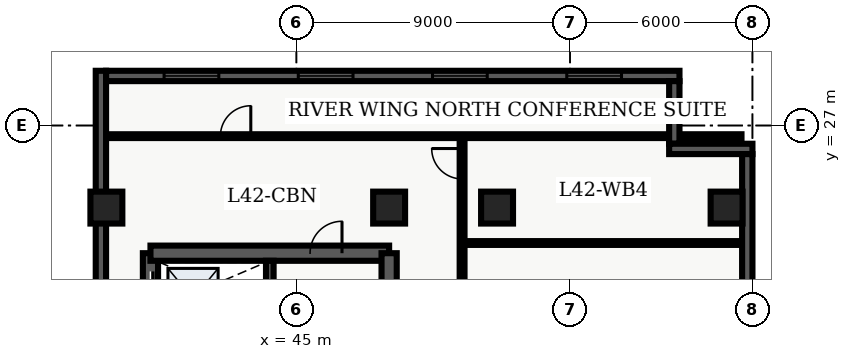
"""IFC4 building model, lengths in metres.
Left out: names, types, materials, properties, quantities, classifications, styles, units other than length and angle.
Written with IfcOpenShell. Run it as: python <this file> out.ifc"""

import sys

from ifc_helpers import new_model, entity, si_unit, converted_unit, direction, frame, origin_with_axes, origin_2d_with_axis, place, context, subcontext, project, spatial, polyline, rectangle, outline, extrude, element, fill, save


model = new_model("IFC4")
c1 = context("Model", 3, precision=1e-05, world=origin_with_axes(), true_north=direction((0.0, 1.0)))
c2 = subcontext(c1, "Body", "Model", "MODEL_VIEW")
j1 = project(units=[si_unit("LENGTHUNIT", "METRE"), converted_unit("PLANEANGLEUNIT", "DEGREE", entity("IfcPlaneAngleMeasure", 0.017), si_unit("PLANEANGLEUNIT", "RADIAN"), dimensions=[0, 0, 0, 0, 0, 0, 0])], contexts=[c1])
p1 = place(None, origin_with_axes())
s1 = spatial("IfcSite", under=j1, at=p1, CompositionType="ELEMENT")
p2 = place(p1, origin_with_axes())
s2 = spatial("IfcBuilding", under=s1, at=p2, CompositionType="ELEMENT")
p3 = place(p2, frame((0.0, 0.0, 171.9), z_axis=(0.0, 0.0, 1.0), x_axis=(1.0, 0.0, 0.0)))
s3 = spatial("IfcBuildingStorey", under=s2, at=p3, CompositionType="ELEMENT", Elevation=171.9)
p4 = place(p3, frame((40.2, 7.2, 0.0), z_axis=(0.0, 0.0, 1.0), x_axis=(0.0, 1.0, 0.0)))
e1 = element("IfcWall", 1, at=p4, inside=s3, PredefinedType="SHEAR", context=c2, shape_type="SweptSolid", body=[
    extrude(outline(polyline([(0.0, -0.25), (15.6, -0.25), (15.6, 0.25), (0.0, 0.25), (0.0, -0.25)])), origin_with_axes(), (0.0, 0.0, 1.0), 3.66),
])
p5 = place(p4, frame((14.475, 0.0, 0.0), z_axis=(0.0, 0.0, 1.0), x_axis=(1.0, 0.0, 0.0)))
e2 = element("IfcOpeningElement", 2, at=p5, cuts=e1, PredefinedType="OPENING", context=c2, shape_type="SweptSolid", body=[
    extrude(rectangle(XDim=1.05, YDim=0.52, at=origin_2d_with_axis()), origin_with_axes(), (0.0, 0.0, 1.0), 2.15),
])
p6 = place(p4, frame((12.75, 0.0, 0.0), z_axis=(0.0, 0.0, 1.0), x_axis=(1.0, 0.0, 0.0)))
e3 = element("IfcOpeningElement", 3, at=p6, cuts=e1, PredefinedType="OPENING", context=c2, shape_type="SweptSolid", body=[
    extrude(rectangle(XDim=1.2, YDim=0.52, at=origin_2d_with_axis()), origin_with_axes(), (0.0, 0.0, 1.0), 2.15),
])
p7 = place(p4, frame((9.3, 0.0, 0.0), z_axis=(0.0, 0.0, 1.0), x_axis=(1.0, 0.0, 0.0)))
e4 = element("IfcOpeningElement", 4, at=p7, cuts=e1, PredefinedType="OPENING", context=c2, shape_type="SweptSolid", body=[
    extrude(rectangle(XDim=0.9, YDim=0.52, at=origin_2d_with_axis()), origin_with_axes(), (0.0, 0.0, 1.0), 2.15),
])
p8 = place(p3, frame((40.2, 22.8, 0.0), z_axis=(0.0, 0.0, 1.0), x_axis=(1.0, 0.0, 0.0)))
e5 = element("IfcWall", 5, at=p8, inside=s3, PredefinedType="SHEAR", context=c2, shape_type="SweptSolid", body=[
    extrude(outline(polyline([(0.0, -0.25), (7.85, -0.25), (7.85, 0.25), (0.0, 0.25), (0.0, -0.25)])), origin_with_axes(), (0.0, 0.0, 1.0), 3.66),
])
p9 = place(p8, frame((5.775, 0.0, 0.0), z_axis=(0.0, 0.0, 1.0), x_axis=(1.0, 0.0, 0.0)))
e6 = element("IfcOpeningElement", 6, at=p9, cuts=e5, PredefinedType="OPENING", context=c2, shape_type="SweptSolid", body=[
    extrude(rectangle(XDim=1.05, YDim=0.52, at=origin_2d_with_axis()), origin_with_axes(), (0.0, 0.0, 1.0), 2.15),
])
p10 = place(p3, frame((48.05, 7.2, 0.0), z_axis=(0.0, 0.0, 1.0), x_axis=(0.0, 1.0, 0.0)))
e7 = element("IfcWall", 7, at=p10, inside=s3, PredefinedType="SHEAR", context=c2, shape_type="SweptSolid", body=[
    extrude(outline(polyline([(0.0, -0.25), (15.6, -0.25), (15.6, 0.25), (0.0, 0.25), (0.0, -0.25)])), origin_with_axes(), (0.0, 0.0, 1.0), 3.66),
])
p11 = place(p10, frame((5.975, 0.0, 0.0), z_axis=(0.0, 0.0, 1.0), x_axis=(1.0, 0.0, 0.0)))
e8 = element("IfcOpeningElement", 8, at=p11, cuts=e7, PredefinedType="OPENING", context=c2, shape_type="SweptSolid", body=[
    extrude(rectangle(XDim=1.05, YDim=0.52, at=origin_2d_with_axis()), origin_with_axes(), (0.0, 0.0, 1.0), 2.15),
])
p12 = place(p10, frame((2.725, 0.0, 0.0), z_axis=(0.0, 0.0, 1.0), x_axis=(1.0, 0.0, 0.0)))
e9 = element("IfcOpeningElement", 9, at=p12, cuts=e7, PredefinedType="OPENING", context=c2, shape_type="SweptSolid", body=[
    extrude(rectangle(XDim=0.95, YDim=0.52, at=origin_2d_with_axis()), origin_with_axes(), (0.0, 0.0, 1.0), 2.15),
])
p13 = place(p3, frame((44.125, 7.45, 0.0), z_axis=(0.0, 0.0, 1.0), x_axis=(0.0, 1.0, 0.0)))
e10 = element("IfcWall", 10, at=p13, inside=s3, PredefinedType="SHEAR", context=c2, shape_type="SweptSolid", body=[
    extrude(outline(polyline([(0.0, -0.125), (15.1, -0.125), (15.1, 0.125), (0.0, 0.125), (0.0, -0.125)])), origin_with_axes(), (0.0, 0.0, 1.0), 3.66),
])
for number, where, z_axis, x_axis in (
    (11, (38.75, 24.3, 0.0), (0.0, 0.0, 1.0), (1.0, 0.0, 0.0)),
    (12, (48.05, 24.3, 0.0), (0.0, 0.0, 1.0), (1.0, 0.0, 0.0)),
    (13, (51.6, 24.3, 0.0), (0.0, 0.0, 1.0), (1.0, 0.0, 0.0)),
    (14, (59.15, 24.3, 0.0), (0.0, 0.0, 1.0), (1.0, 0.0, 0.0)),
):
    element("IfcColumn", number, at=place(p3, frame(where, z_axis=z_axis, x_axis=x_axis)), inside=s3, PredefinedType="COLUMN", context=c2, shape_type="SweptSolid", body=[
        extrude(rectangle(XDim=1.05, YDim=1.05, at=origin_2d_with_axis()), origin_with_axes(), (0.0, 0.0, 1.0), 3.9),
    ])
p14 = place(p3, frame((50.45, 7.85, 0.0), z_axis=(0.0, 0.0, 1.0), x_axis=(0.0, 1.0, 0.0)))
e15 = element("IfcWall", 15, at=p14, inside=s3, PredefinedType="PARTITIONING", context=c2, shape_type="SweptSolid", body=[
    extrude(outline(polyline([(0.0, -0.08), (18.8, -0.08), (18.8, 0.08), (0.0, 0.08), (0.0, -0.08)])), origin_with_axes(), (0.0, 0.0, 1.0), 2.7),
])
p15 = place(p14, frame((6.934, 0.0, 0.0), z_axis=(0.0, 0.0, 1.0), x_axis=(1.0, 0.0, 0.0)))
e16 = element("IfcOpeningElement", 16, at=p15, cuts=e15, PredefinedType="OPENING", context=c2, shape_type="SweptSolid", body=[
    extrude(rectangle(XDim=1.0, YDim=0.18, at=origin_2d_with_axis()), origin_with_axes(), (0.0, 0.0, 1.0), 2.15),
])
p16 = place(p14, frame((12.373, 0.0, 0.0), z_axis=(0.0, 0.0, 1.0), x_axis=(1.0, 0.0, 0.0)))
e17 = element("IfcOpeningElement", 17, at=p16, cuts=e15, PredefinedType="OPENING", context=c2, shape_type="SweptSolid", body=[
    extrude(rectangle(XDim=1.0, YDim=0.18, at=origin_2d_with_axis()), origin_with_axes(), (0.0, 0.0, 1.0), 2.15),
])
p17 = place(p14, frame((17.893, 0.0, 0.0), z_axis=(0.0, 0.0, 1.0), x_axis=(1.0, 0.0, 0.0)))
e18 = element("IfcOpeningElement", 18, at=p17, cuts=e15, PredefinedType="OPENING", context=c2, shape_type="SweptSolid", body=[
    extrude(rectangle(XDim=1.0, YDim=0.18, at=origin_2d_with_axis()), origin_with_axes(), (0.0, 0.0, 1.0), 2.15),
])
p18 = place(p3, frame((38.735, 26.65, 0.0), z_axis=(0.0, 0.0, 1.0), x_axis=(1.0, 0.0, 0.0)))
e19 = element("IfcWall", 19, at=p18, inside=s3, PredefinedType="PARTITIONING", context=c2, shape_type="SweptSolid", body=[
    extrude(outline(polyline([(0.0, -0.062), (20.905, -0.062), (20.905, 0.062), (0.0, 0.062), (0.0, -0.062)])), origin_with_axes(), (0.0, 0.0, 1.0), 2.7),
])
p19 = place(p18, frame((4.265, 0.0, 0.0), z_axis=(0.0, 0.0, 1.0), x_axis=(1.0, 0.0, 0.0)))
e20 = element("IfcOpeningElement", 20, at=p19, cuts=e19, PredefinedType="OPENING", context=c2, shape_type="SweptSolid", body=[
    extrude(rectangle(XDim=1.0, YDim=0.145, at=origin_2d_with_axis()), origin_with_axes(), (0.0, 0.0, 1.0), 2.15),
])
p20 = place(p3, frame((50.57, 23.135, 0.0), z_axis=(0.0, 0.0, 1.0), x_axis=(1.0, 0.0, 0.0)))
e21 = element("IfcWall", 21, at=p20, inside=s3, PredefinedType="PARTITIONING", context=c2, shape_type="SweptSolid", body=[
    extrude(outline(polyline([(0.0, -0.062), (9.095, -0.062), (9.095, 0.062), (0.0, 0.062), (0.0, -0.062)])), origin_with_axes(), (0.0, 0.0, 1.0), 2.7),
])
p21 = place(p3, frame((38.57, 21.26, 0.0), z_axis=(0.0, 0.0, 1.0), x_axis=(0.0, 1.0, 0.0)))
e22 = element("IfcWall", 22, at=p21, inside=s3, PredefinedType="SOLIDWALL", context=c2, shape_type="SweptSolid", body=[
    extrude(outline(polyline([(0.0, -0.17), (7.54, -0.17), (7.54, 0.17), (0.0, 0.17), (0.0, -0.17)])), origin_with_axes(), (0.0, 0.0, 1.0), 3.66),
])
p22 = place(p3, frame((38.74, 28.63, 0.0), z_axis=(0.0, 0.0, 1.0), x_axis=(1.0, 0.0, 0.0)))
e23 = element("IfcWall", 23, at=p22, inside=s3, PredefinedType="SOLIDWALL", context=c2, shape_type="SweptSolid", body=[
    extrude(outline(polyline([(0.0, -0.17), (18.86, -0.17), (18.86, 0.17), (0.0, 0.17), (0.0, -0.17)])), origin_with_axes(), (0.0, 0.0, 1.0), 3.66),
])
p23 = place(p22, frame((2.808, 0.0, 0.45), z_axis=(0.0, 0.0, 1.0), x_axis=(1.0, 0.0, 0.0)))
e24 = element("IfcOpeningElement", 24, at=p23, cuts=e23, PredefinedType="OPENING", context=c2, shape_type="SweptSolid", body=[
    extrude(rectangle(XDim=1.8, YDim=0.36, at=origin_2d_with_axis()), origin_with_axes(), (0.0, 0.0, 1.0), 2.1),
])
p24 = place(p22, frame((7.222, 0.0, 0.45), z_axis=(0.0, 0.0, 1.0), x_axis=(1.0, 0.0, 0.0)))
e25 = element("IfcOpeningElement", 25, at=p24, cuts=e23, PredefinedType="OPENING", context=c2, shape_type="SweptSolid", body=[
    extrude(rectangle(XDim=1.8, YDim=0.36, at=origin_2d_with_axis()), origin_with_axes(), (0.0, 0.0, 1.0), 2.1),
])
p25 = place(p22, frame((11.637, 0.0, 0.45), z_axis=(0.0, 0.0, 1.0), x_axis=(1.0, 0.0, 0.0)))
e26 = element("IfcOpeningElement", 26, at=p25, cuts=e23, PredefinedType="OPENING", context=c2, shape_type="SweptSolid", body=[
    extrude(rectangle(XDim=1.8, YDim=0.36, at=origin_2d_with_axis()), origin_with_axes(), (0.0, 0.0, 1.0), 2.1),
])
p26 = place(p22, frame((16.053, 0.0, 0.45), z_axis=(0.0, 0.0, 1.0), x_axis=(1.0, 0.0, 0.0)))
e27 = element("IfcOpeningElement", 27, at=p26, cuts=e23, PredefinedType="OPENING", context=c2, shape_type="SweptSolid", body=[
    extrude(rectangle(XDim=1.8, YDim=0.36, at=origin_2d_with_axis()), origin_with_axes(), (0.0, 0.0, 1.0), 2.1),
])
p27 = place(p3, frame((57.43, 28.46, 0.0), z_axis=(0.0, 0.0, 1.0), x_axis=(0.0, -1.0, 0.0)))
e28 = element("IfcWall", 28, at=p27, inside=s3, PredefinedType="SOLIDWALL", context=c2, shape_type="SweptSolid", body=[
    extrude(outline(polyline([(0.0, -0.17), (2.06, -0.17), (2.06, 0.17), (0.0, 0.17), (0.0, -0.17)])), origin_with_axes(), (0.0, 0.0, 1.0), 3.66),
])
p28 = place(p3, frame((57.26, 26.23, 0.0), z_axis=(0.0, 0.0, 1.0), x_axis=(1.0, 0.0, 0.0)))
e29 = element("IfcWall", 29, at=p28, inside=s3, PredefinedType="SOLIDWALL", context=c2, shape_type="SweptSolid", body=[
    extrude(outline(polyline([(0.0, -0.17), (2.74, -0.17), (2.74, 0.17), (0.0, 0.17), (0.0, -0.17)])), origin_with_axes(), (0.0, 0.0, 1.0), 3.66),
])
p29 = place(p3, frame((59.83, 26.06, 0.0), z_axis=(0.0, 0.0, 1.0), x_axis=(0.0, -1.0, 0.0)))
e30 = element("IfcWall", 30, at=p29, inside=s3, PredefinedType="SOLIDWALL", context=c2, shape_type="SweptSolid", body=[
    extrude(outline(polyline([(0.0, -0.17), (23.66, -0.17), (23.66, 0.17), (0.0, 0.17), (0.0, -0.17)])), origin_with_axes(), (0.0, 0.0, 1.0), 3.66),
])
p30 = place(p29, frame((11.83, 0.0, 0.45), z_axis=(0.0, 0.0, 1.0), x_axis=(1.0, 0.0, 0.0)))
e31 = element("IfcOpeningElement", 31, at=p30, cuts=e30, PredefinedType="OPENING", context=c2, shape_type="SweptSolid", body=[
    extrude(rectangle(XDim=1.8, YDim=0.36, at=origin_2d_with_axis()), origin_with_axes(), (0.0, 0.0, 1.0), 2.1),
])
p31 = place(p29, frame((20.364, 0.0, 0.45), z_axis=(0.0, 0.0, 1.0), x_axis=(1.0, 0.0, 0.0)))
e32 = element("IfcOpeningElement", 32, at=p31, cuts=e30, PredefinedType="OPENING", context=c2, shape_type="SweptSolid", body=[
    extrude(rectangle(XDim=1.8, YDim=0.36, at=origin_2d_with_axis()), origin_with_axes(), (0.0, 0.0, 1.0), 2.1),
])
p32 = place(p4, frame((14.475, 0.0, 0.0), z_axis=(0.0, 0.0, 1.0), x_axis=(1.0, 0.0, 0.0)))
e33 = element("IfcDoor", 33, at=p32, inside=s3, OperationType="SLIDING_TO_RIGHT", PredefinedType="DOOR", context=c2, shape_type="SweptSolid", body=[
    extrude(rectangle(XDim=1.05, YDim=0.09, at=origin_2d_with_axis()), origin_with_axes(), (0.0, 0.0, 1.0), 2.15),
])
fill(e2, e33)
p33 = place(p8, frame((5.775, 0.0, 0.0), z_axis=(0.0, 0.0, 1.0), x_axis=(1.0, 0.0, 0.0)))
e34 = element("IfcDoor", 34, at=p33, inside=s3, OperationType="SINGLE_SWING_RIGHT", PredefinedType="DOOR", context=c2, shape_type="SweptSolid", body=[
    extrude(rectangle(XDim=1.05, YDim=0.09, at=origin_2d_with_axis()), origin_with_axes(), (0.0, 0.0, 1.0), 2.15),
])
fill(e6, e34)
p34 = place(p18, frame((4.265, 0.0, 0.0), z_axis=(0.0, 0.0, 1.0), x_axis=(1.0, 0.0, 0.0)))
e35 = element("IfcDoor", 35, at=p34, inside=s3, OperationType="SINGLE_SWING_RIGHT", PredefinedType="DOOR", context=c2, shape_type="SweptSolid", body=[
    extrude(rectangle(XDim=1.0, YDim=0.075, at=origin_2d_with_axis()), origin_with_axes(), (0.0, 0.0, 1.0), 2.15),
])
fill(e20, e35)
p35 = place(p14, frame((17.893, 0.0, 0.0), z_axis=(0.0, 0.0, 1.0), x_axis=(1.0, 0.0, 0.0)))
e36 = element("IfcDoor", 36, at=p35, inside=s3, OperationType="SINGLE_SWING_RIGHT", PredefinedType="DOOR", context=c2, shape_type="SweptSolid", body=[
    extrude(rectangle(XDim=1.0, YDim=0.09, at=origin_2d_with_axis()), origin_with_axes(), (0.0, 0.0, 1.0), 2.15),
])
fill(e18, e36)
p36 = place(p22, frame((2.808, 0.0, 0.45), z_axis=(0.0, 0.0, 1.0), x_axis=(1.0, 0.0, 0.0)))
e37 = element("IfcWindow", 37, at=p36, inside=s3, PredefinedType="WINDOW", context=c2, shape_type="SweptSolid", body=[
    extrude(rectangle(XDim=1.8, YDim=0.09, at=origin_2d_with_axis()), origin_with_axes(), (0.0, 0.0, 1.0), 2.1),
])
fill(e24, e37)
p37 = place(p22, frame((7.222, 0.0, 0.45), z_axis=(0.0, 0.0, 1.0), x_axis=(1.0, 0.0, 0.0)))
e38 = element("IfcWindow", 38, at=p37, inside=s3, PredefinedType="WINDOW", context=c2, shape_type="SweptSolid", body=[
    extrude(rectangle(XDim=1.8, YDim=0.09, at=origin_2d_with_axis()), origin_with_axes(), (0.0, 0.0, 1.0), 2.1),
])
fill(e25, e38)
p38 = place(p22, frame((11.637, 0.0, 0.45), z_axis=(0.0, 0.0, 1.0), x_axis=(1.0, 0.0, 0.0)))
e39 = element("IfcWindow", 39, at=p38, inside=s3, PredefinedType="WINDOW", context=c2, shape_type="SweptSolid", body=[
    extrude(rectangle(XDim=1.8, YDim=0.09, at=origin_2d_with_axis()), origin_with_axes(), (0.0, 0.0, 1.0), 2.1),
])
fill(e26, e39)
p39 = place(p22, frame((16.053, 0.0, 0.45), z_axis=(0.0, 0.0, 1.0), x_axis=(1.0, 0.0, 0.0)))
e40 = element("IfcWindow", 40, at=p39, inside=s3, PredefinedType="WINDOW", context=c2, shape_type="SweptSolid", body=[
    extrude(rectangle(XDim=1.8, YDim=0.09, at=origin_2d_with_axis()), origin_with_axes(), (0.0, 0.0, 1.0), 2.1),
])
fill(e27, e40)
save(model, sys.argv[1])
